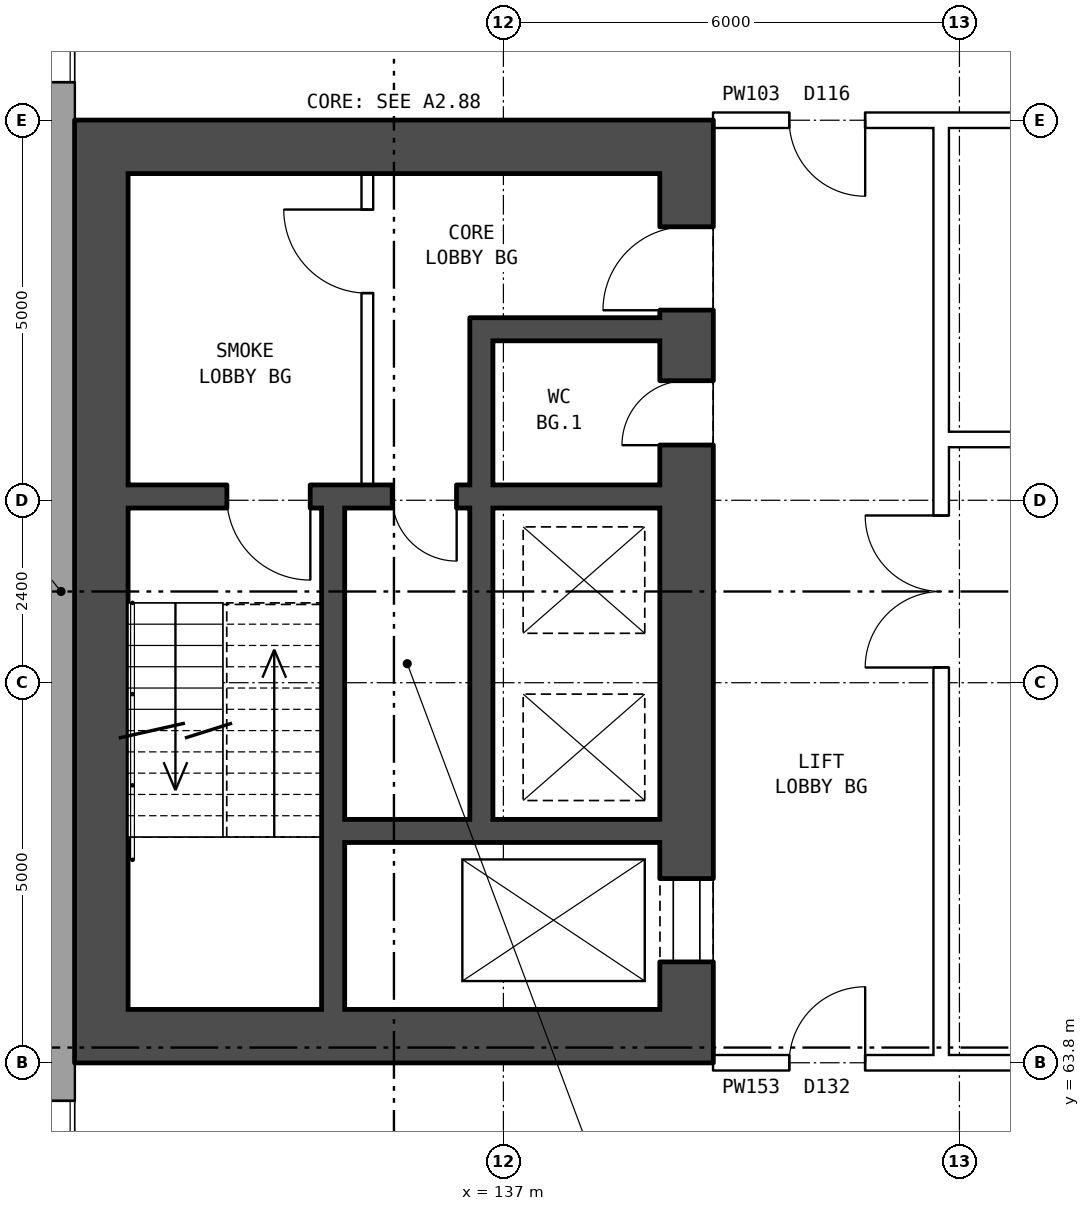
"""IFC4 building model, lengths in metres.
Left out: names, types, materials, properties, quantities, classifications, styles, units other than length and angle.
Written with IfcOpenShell. Run it as: python <this file> out.ifc"""

import sys

from ifc_helpers import new_model, si_unit, direction, frame, frame_2d, origin, place, context, subcontext, project, spatial, rectangle, extrude, element, fill, save


model = new_model("IFC4")
c1 = context("Model", 3, precision=1e-05, world=origin(), true_north=direction((0.0, 1.0)))
c2 = subcontext(c1, "Body", "Model", "MODEL_VIEW")
j1 = project(units=[si_unit("LENGTHUNIT", "METRE"), si_unit("PLANEANGLEUNIT", "RADIAN")], contexts=[c1])
p1 = place(None, origin())
s1 = spatial("IfcSite", under=j1, at=p1, CompositionType="ELEMENT")
p2 = place(p1, origin())
s2 = spatial("IfcBuilding", under=s1, at=p2, CompositionType="ELEMENT")
p3 = place(p2, frame((0.0, 0.0, 67.4)))
s3 = spatial("IfcBuildingStorey", under=s2, at=p3, CompositionType="ELEMENT", Elevation=67.4)
p4 = place(p3, frame((131.18, 82.925, 0.0), z_axis=(0.0, 0.0, 1.0), x_axis=(0.0, -1.0, 0.0)))
e1 = element("IfcWall", 1, at=p4, inside=s3, PredefinedType="STANDARD", context=c2, shape_type="SweptSolid", body=[
    extrude(rectangle(XDim=25.851, YDim=0.36, at=frame_2d((12.925, 0.0))), origin(), (0.0, 0.0, 1.0), 3.6),
])
p5 = place(p4, frame((1.625, 0.0, 0.8)))
e2 = element("IfcOpeningElement", 2, at=p5, cuts=e1, PredefinedType="OPENING", context=c2, shape_type="SweptSolid", body=[
    extrude(rectangle(XDim=1.6, YDim=1.8, at=frame_2d((0.8, 0.9))), frame((0.0, 0.19, 0.0), z_axis=(0.0, -1.0, 0.0), x_axis=(1.0, 0.0, 0.0)), (0.0, 0.0, 1.0), 0.38),
])
p6 = place(p4, frame((4.625, 0.0, 0.8)))
e3 = element("IfcOpeningElement", 3, at=p6, cuts=e1, PredefinedType="OPENING", context=c2, shape_type="SweptSolid", body=[
    extrude(rectangle(XDim=1.6, YDim=1.8, at=frame_2d((0.8, 0.9))), frame((0.0, 0.19, 0.0), z_axis=(0.0, -1.0, 0.0), x_axis=(1.0, 0.0, 0.0)), (0.0, 0.0, 1.0), 0.38),
])
p7 = place(p4, frame((19.625, 0.0, 0.8)))
e4 = element("IfcOpeningElement", 4, at=p7, cuts=e1, PredefinedType="OPENING", context=c2, shape_type="SweptSolid", body=[
    extrude(rectangle(XDim=1.6, YDim=1.8, at=frame_2d((0.8, 0.9))), frame((0.0, 0.19, 0.0), z_axis=(0.0, -1.0, 0.0), x_axis=(1.0, 0.0, 0.0)), (0.0, 0.0, 1.0), 0.38),
])
p8 = place(p4, frame((22.625, 0.0, 0.8)))
e5 = element("IfcOpeningElement", 5, at=p8, cuts=e1, PredefinedType="OPENING", context=c2, shape_type="SweptSolid", body=[
    extrude(rectangle(XDim=1.6, YDim=1.8, at=frame_2d((0.8, 0.9))), frame((0.0, 0.19, 0.0), z_axis=(0.0, -1.0, 0.0), x_axis=(1.0, 0.0, 0.0)), (0.0, 0.0, 1.0), 0.38),
])
p9 = place(p3, frame((139.41, 64.5, 0.0), z_axis=(0.0, 0.0, 1.0), x_axis=(0.0, 1.0, 0.0)))
e6 = element("IfcWall", 6, at=p9, inside=s3, PredefinedType="SHEAR", context=c2, shape_type="SweptSolid", body=[
    extrude(rectangle(XDim=11.0, YDim=0.7, at=frame_2d((5.5, 0.0))), origin(), (0.0, 0.0, 1.0), 3.6),
])
p10 = place(p9, frame((0.625, 0.0, 0.0)))
e7 = element("IfcOpeningElement", 7, at=p10, cuts=e6, PredefinedType="OPENING", context=c2, shape_type="SweptSolid", body=[
    extrude(rectangle(XDim=1.1, YDim=2.1, at=frame_2d((0.55, 1.05))), frame((0.0, 0.36, 0.0), z_axis=(0.0, -1.0, 0.0), x_axis=(1.0, 0.0, 0.0)), (0.0, 0.0, 1.0), 0.72),
])
p11 = place(p9, frame((9.2, 0.0, 0.0)))
e8 = element("IfcOpeningElement", 8, at=p11, cuts=e6, PredefinedType="OPENING", context=c2, shape_type="SweptSolid", body=[
    extrude(rectangle(XDim=1.1, YDim=2.1, at=frame_2d((0.55, 1.05))), frame((0.0, 0.36, 0.0), z_axis=(0.0, -1.0, 0.0), x_axis=(1.0, 0.0, 0.0)), (0.0, 0.0, 1.0), 0.72),
])
p12 = place(p9, frame((7.425, 0.0, 0.0)))
e9 = element("IfcOpeningElement", 9, at=p12, cuts=e6, PredefinedType="OPENING", context=c2, shape_type="SweptSolid", body=[
    extrude(rectangle(XDim=0.85, YDim=2.1, at=frame_2d((0.425, 1.05))), frame((0.0, 0.36, 0.0), z_axis=(0.0, -1.0, 0.0), x_axis=(1.0, 0.0, 0.0)), (0.0, 0.0, 1.0), 0.72),
])
p13 = place(p3, frame((131.71, 64.5, 0.0), z_axis=(0.0, 0.0, 1.0), x_axis=(0.0, 1.0, 0.0)))
e10 = element("IfcWall", 10, at=p13, inside=s3, PredefinedType="SHEAR", context=c2, shape_type="SweptSolid", body=[
    extrude(rectangle(XDim=11.0, YDim=0.7, at=frame_2d((5.5, 0.0))), origin(), (0.0, 0.0, 1.0), 3.6),
])
for number, where, z_axis, x_axis in (
    (11, (139.76, 64.15, 0.0), (0.0, 0.0, 1.0), (-1.0, 0.0, 0.0)),
    (12, (139.76, 75.85, 0.0), (0.0, 0.0, 1.0), (-1.0, 0.0, 0.0)),
):
    element("IfcWall", number, at=place(p3, frame(where, z_axis=z_axis, x_axis=x_axis)), inside=s3, PredefinedType="SHEAR", context=c2, shape_type="SweptSolid", body=[
        extrude(rectangle(XDim=8.4, YDim=0.7, at=frame_2d((4.2, 0.0))), origin(), (0.0, 0.0, 1.0), 3.6),
    ])
p14 = place(p3, frame((139.06, 66.85, 0.0), z_axis=(0.0, 0.0, 1.0), x_axis=(-1.0, 0.0, 0.0)))
e13 = element("IfcWall", 13, at=p14, inside=s3, PredefinedType="SHEAR", context=c2, shape_type="SweptSolid", body=[
    extrude(rectangle(XDim=4.15, YDim=0.3, at=frame_2d((2.075, 0.0))), origin(), (0.0, 0.0, 1.0), 3.6),
])
p15 = place(p3, frame((139.06, 71.25, 0.0), z_axis=(0.0, 0.0, 1.0), x_axis=(-1.0, 0.0, 0.0)))
e14 = element("IfcWall", 14, at=p15, inside=s3, PredefinedType="SHEAR", context=c2, shape_type="SweptSolid", body=[
    extrude(rectangle(XDim=7.0, YDim=0.3, at=frame_2d((3.5, 0.0))), origin(), (0.0, 0.0, 1.0), 3.6),
])
p16 = place(p15, frame((4.6, 0.0, 0.0)))
e15 = element("IfcOpeningElement", 15, at=p16, cuts=e14, PredefinedType="OPENING", context=c2, shape_type="SweptSolid", body=[
    extrude(rectangle(XDim=1.1, YDim=2.1, at=frame_2d((0.55, 1.05))), frame((0.0, 0.16, 0.0), z_axis=(0.0, -1.0, 0.0), x_axis=(1.0, 0.0, 0.0)), (0.0, 0.0, 1.0), 0.32),
])
p17 = place(p15, frame((2.675, 0.0, 0.0)))
e16 = element("IfcOpeningElement", 16, at=p17, cuts=e14, PredefinedType="OPENING", context=c2, shape_type="SweptSolid", body=[
    extrude(rectangle(XDim=0.85, YDim=2.1, at=frame_2d((0.425, 1.05))), frame((0.0, 0.16, 0.0), z_axis=(0.0, -1.0, 0.0), x_axis=(1.0, 0.0, 0.0)), (0.0, 0.0, 1.0), 0.32),
])
p18 = place(p3, frame((139.06, 73.45, 0.0), z_axis=(0.0, 0.0, 1.0), x_axis=(-1.0, 0.0, 0.0)))
e17 = element("IfcWall", 17, at=p18, inside=s3, PredefinedType="SHEAR", context=c2, shape_type="SweptSolid", body=[
    extrude(rectangle(XDim=2.2, YDim=0.3, at=frame_2d((1.1, 0.0))), origin(), (0.0, 0.0, 1.0), 3.6),
])
p19 = place(p3, frame((136.71, 67.0, 0.0), z_axis=(0.0, 0.0, 1.0), x_axis=(0.0, 1.0, 0.0)))
e18 = element("IfcWall", 18, at=p19, inside=s3, PredefinedType="SHEAR", context=c2, shape_type="SweptSolid", body=[
    extrude(rectangle(XDim=4.1, YDim=0.3, at=frame_2d((2.05, 0.0))), origin(), (0.0, 0.0, 1.0), 3.6),
])
p20 = place(p3, frame((136.71, 71.4, 0.0), z_axis=(0.0, 0.0, 1.0), x_axis=(0.0, 1.0, 0.0)))
e19 = element("IfcWall", 19, at=p20, inside=s3, PredefinedType="SHEAR", context=c2, shape_type="SweptSolid", body=[
    extrude(rectangle(XDim=2.2, YDim=0.3, at=frame_2d((1.1, 0.0))), origin(), (0.0, 0.0, 1.0), 3.6),
])
p21 = place(p3, frame((135.21, 71.4, 0.0), z_axis=(0.0, 0.0, 1.0), x_axis=(0.0, 1.0, 0.0)))
e20 = element("IfcWall", 20, at=p21, inside=s3, PredefinedType="PARTITIONING", context=c2, shape_type="SweptSolid", body=[
    extrude(rectangle(XDim=4.1, YDim=0.15, at=frame_2d((2.05, 0.0))), origin(), (0.0, 0.0, 1.0), 3.6),
])
p22 = place(p21, frame((2.525, 0.0, 0.0)))
e21 = element("IfcOpeningElement", 21, at=p22, cuts=e20, PredefinedType="OPENING", context=c2, shape_type="SweptSolid", body=[
    extrude(rectangle(XDim=1.1, YDim=2.1, at=frame_2d((0.55, 1.05))), frame((0.0, 0.085, 0.0), z_axis=(0.0, -1.0, 0.0), x_axis=(1.0, 0.0, 0.0)), (0.0, 0.0, 1.0), 0.17),
])
p23 = place(p3, frame((134.76, 64.5, 0.0), z_axis=(0.0, 0.0, 1.0), x_axis=(0.0, 1.0, 0.0)))
e22 = element("IfcWall", 22, at=p23, inside=s3, PredefinedType="SHEAR", context=c2, shape_type="SweptSolid", body=[
    extrude(rectangle(XDim=6.6, YDim=0.3, at=frame_2d((3.3, 0.0))), origin(), (0.0, 0.0, 1.0), 3.6),
])
p24 = place(p3, frame((142.76, 63.9, 0.0), z_axis=(0.0, 0.0, 1.0), x_axis=(0.0, 1.0, 0.0)))
e23 = element("IfcWall", 23, at=p24, inside=s3, PredefinedType="PARTITIONING", context=c2, shape_type="SweptSolid", body=[
    extrude(rectangle(XDim=12.2, YDim=0.2, at=frame_2d((6.1, 0.0))), origin(), (0.0, 0.0, 1.0), 3.6),
])
p25 = place(p24, frame((5.1, 0.0, 0.0)))
e24 = element("IfcOpeningElement", 24, at=p25, cuts=e23, PredefinedType="OPENING", context=c2, shape_type="SweptSolid", body=[
    extrude(rectangle(XDim=2.0, YDim=2.1, at=frame_2d((1.0, 1.05))), frame((0.0, 0.11, 0.0), z_axis=(0.0, -1.0, 0.0), x_axis=(1.0, 0.0, 0.0)), (0.0, 0.0, 1.0), 0.22),
])
p26 = place(p3, frame((142.76, 63.8, 0.0), z_axis=(0.0, 0.0, 1.0), x_axis=(1.0, 0.0, 0.0)))
e25 = element("IfcWall", 25, at=p26, inside=s3, PredefinedType="PARTITIONING", context=c2, shape_type="SweptSolid", body=[
    extrude(rectangle(XDim=14.48, YDim=0.2, at=frame_2d((7.24, 0.0))), origin(), (0.0, 0.0, 1.0), 3.6),
])
p27 = place(p3, frame((139.76, 63.8, 0.0), z_axis=(0.0, 0.0, 1.0), x_axis=(1.0, 0.0, 0.0)))
e26 = element("IfcWall", 26, at=p27, inside=s3, PredefinedType="PARTITIONING", context=c2, shape_type="SweptSolid", body=[
    extrude(rectangle(XDim=3.0, YDim=0.2, at=frame_2d((1.5, 0.0))), origin(), (0.0, 0.0, 1.0), 3.6),
])
p28 = place(p27, frame((1.0, 0.0, 0.0)))
e27 = element("IfcOpeningElement", 27, at=p28, cuts=e26, PredefinedType="OPENING", context=c2, shape_type="SweptSolid", body=[
    extrude(rectangle(XDim=1.0, YDim=2.1, at=frame_2d((0.5, 1.05))), frame((0.0, 0.11, 0.0), z_axis=(0.0, -1.0, 0.0), x_axis=(1.0, 0.0, 0.0)), (0.0, 0.0, 1.0), 0.22),
])
p29 = place(p3, frame((142.76, 72.0, 0.0), z_axis=(0.0, 0.0, 1.0), x_axis=(1.0, 0.0, 0.0)))
e28 = element("IfcWall", 28, at=p29, inside=s3, PredefinedType="PARTITIONING", context=c2, shape_type="SweptSolid", body=[
    extrude(rectangle(XDim=14.48, YDim=0.2, at=frame_2d((7.24, 0.0))), origin(), (0.0, 0.0, 1.0), 3.6),
])
p30 = place(p29, frame((6.34, 0.0, 0.0)))
e29 = element("IfcOpeningElement", 29, at=p30, cuts=e28, PredefinedType="OPENING", context=c2, shape_type="SweptSolid", body=[
    extrude(rectangle(XDim=1.8, YDim=2.1, at=frame_2d((0.9, 1.05))), frame((0.0, 0.11, 0.0), z_axis=(0.0, -1.0, 0.0), x_axis=(1.0, 0.0, 0.0)), (0.0, 0.0, 1.0), 0.22),
])
p31 = place(p3, frame((142.76, 76.2, 0.0), z_axis=(0.0, 0.0, 1.0), x_axis=(1.0, 0.0, 0.0)))
e30 = element("IfcWall", 30, at=p31, inside=s3, PredefinedType="PARTITIONING", context=c2, shape_type="SweptSolid", body=[
    extrude(rectangle(XDim=14.48, YDim=0.2, at=frame_2d((7.24, 0.0))), origin(), (0.0, 0.0, 1.0), 3.6),
])
p32 = place(p31, frame((6.34, 0.0, 0.0)))
e31 = element("IfcOpeningElement", 31, at=p32, cuts=e30, PredefinedType="OPENING", context=c2, shape_type="SweptSolid", body=[
    extrude(rectangle(XDim=1.8, YDim=2.1, at=frame_2d((0.9, 1.05))), frame((0.0, 0.11, 0.0), z_axis=(0.0, -1.0, 0.0), x_axis=(1.0, 0.0, 0.0)), (0.0, 0.0, 1.0), 0.22),
])
p33 = place(p3, frame((139.76, 76.2, 0.0), z_axis=(0.0, 0.0, 1.0), x_axis=(1.0, 0.0, 0.0)))
e32 = element("IfcWall", 32, at=p33, inside=s3, PredefinedType="PARTITIONING", context=c2, shape_type="SweptSolid", body=[
    extrude(rectangle(XDim=3.0, YDim=0.2, at=frame_2d((1.5, 0.0))), origin(), (0.0, 0.0, 1.0), 3.6),
])
p34 = place(p33, frame((1.0, 0.0, 0.0)))
e33 = element("IfcOpeningElement", 33, at=p34, cuts=e32, PredefinedType="OPENING", context=c2, shape_type="SweptSolid", body=[
    extrude(rectangle(XDim=1.0, YDim=2.1, at=frame_2d((0.5, 1.05))), frame((0.0, 0.11, 0.0), z_axis=(0.0, -1.0, 0.0), x_axis=(1.0, 0.0, 0.0)), (0.0, 0.0, 1.0), 0.22),
])
p35 = place(p6, origin())
e34 = element("IfcWindow", 34, at=p35, inside=s3, PartitioningType="SINGLE_PANEL", PredefinedType="WINDOW", context=c2, shape_type="SweptSolid", body=[
    extrude(rectangle(XDim=1.6, YDim=1.8, at=frame_2d((0.8, 0.9))), frame((0.0, 0.15, 0.0), z_axis=(0.0, -1.0, 0.0), x_axis=(1.0, 0.0, 0.0)), (0.0, 0.0, 1.0), 0.06),
])
fill(e3, e34)
p36 = place(p7, origin())
e35 = element("IfcWindow", 35, at=p36, inside=s3, PartitioningType="SINGLE_PANEL", PredefinedType="WINDOW", context=c2, shape_type="SweptSolid", body=[
    extrude(rectangle(XDim=1.6, YDim=1.8, at=frame_2d((0.8, 0.9))), frame((0.0, 0.15, 0.0), z_axis=(0.0, -1.0, 0.0), x_axis=(1.0, 0.0, 0.0)), (0.0, 0.0, 1.0), 0.06),
])
fill(e4, e35)
p37 = place(p10, origin())
e36 = element("IfcDoor", 36, at=p37, inside=s3, OperationType="DOUBLE_DOOR_SLIDING", PredefinedType="DOOR", context=c2, shape_type="SweptSolid", body=[
    extrude(rectangle(XDim=1.1, YDim=2.1, at=frame_2d((0.55, 1.05))), frame((0.0, 0.335, 0.0), z_axis=(0.0, -1.0, 0.0), x_axis=(1.0, 0.0, 0.0)), (0.0, 0.0, 1.0), 0.05),
])
fill(e7, e36)
p38 = place(p11, origin())
e37 = element("IfcDoor", 37, at=p38, inside=s3, OperationType="SINGLE_SWING_LEFT", PredefinedType="DOOR", context=c2, shape_type="SweptSolid", body=[
    extrude(rectangle(XDim=1.1, YDim=2.1, at=frame_2d((0.55, 1.05))), frame((0.0, 0.335, 0.0), z_axis=(0.0, -1.0, 0.0), x_axis=(1.0, 0.0, 0.0)), (0.0, 0.0, 1.0), 0.05),
])
fill(e8, e37)
p39 = place(p22, origin())
e38 = element("IfcDoor", 38, at=p39, inside=s3, OperationType="SINGLE_SWING_RIGHT", PredefinedType="DOOR", context=c2, shape_type="SweptSolid", body=[
    extrude(rectangle(XDim=1.1, YDim=2.1, at=frame_2d((0.55, 1.05))), frame((0.0, 0.025, 0.0), z_axis=(0.0, -1.0, 0.0), x_axis=(1.0, 0.0, 0.0)), (0.0, 0.0, 1.0), 0.05),
])
fill(e21, e38)
p40 = place(p16, origin())
e39 = element("IfcDoor", 39, at=p40, inside=s3, OperationType="SINGLE_SWING_LEFT", PredefinedType="DOOR", context=c2, shape_type="SweptSolid", body=[
    extrude(rectangle(XDim=1.1, YDim=2.1, at=frame_2d((0.55, 1.05))), frame((0.0, 0.025, 0.0), z_axis=(0.0, -1.0, 0.0), x_axis=(1.0, 0.0, 0.0)), (0.0, 0.0, 1.0), 0.05),
])
fill(e15, e39)
p41 = place(p12, origin())
e40 = element("IfcDoor", 40, at=p41, inside=s3, OperationType="SINGLE_SWING_LEFT", PredefinedType="DOOR", context=c2, shape_type="SweptSolid", body=[
    extrude(rectangle(XDim=0.85, YDim=2.1, at=frame_2d((0.425, 1.05))), frame((0.0, 0.335, 0.0), z_axis=(0.0, -1.0, 0.0), x_axis=(1.0, 0.0, 0.0)), (0.0, 0.0, 1.0), 0.05),
])
fill(e9, e40)
p42 = place(p17, origin())
e41 = element("IfcDoor", 41, at=p42, inside=s3, OperationType="SINGLE_SWING_LEFT", PredefinedType="DOOR", context=c2, shape_type="SweptSolid", body=[
    extrude(rectangle(XDim=0.85, YDim=2.1, at=frame_2d((0.425, 1.05))), frame((0.0, 0.025, 0.0), z_axis=(0.0, -1.0, 0.0), x_axis=(1.0, 0.0, 0.0)), (0.0, 0.0, 1.0), 0.05),
])
fill(e16, e41)
p43 = place(p25, origin())
e42 = element("IfcDoor", 42, at=p43, inside=s3, OperationType="DOUBLE_DOOR_SINGLE_SWING", PredefinedType="DOOR", context=c2, shape_type="SweptSolid", body=[
    extrude(rectangle(XDim=2.0, YDim=2.1, at=frame_2d((1.0, 1.05))), frame((0.0, 0.025, 0.0), z_axis=(0.0, -1.0, 0.0), x_axis=(1.0, 0.0, 0.0)), (0.0, 0.0, 1.0), 0.05),
])
fill(e24, e42)
p44 = place(p28, origin())
e43 = element("IfcDoor", 43, at=p44, inside=s3, OperationType="SINGLE_SWING_RIGHT", PredefinedType="DOOR", context=c2, shape_type="SweptSolid", body=[
    extrude(rectangle(XDim=1.0, YDim=2.1, at=frame_2d((0.5, 1.05))), frame((0.0, 0.025, 0.0), z_axis=(0.0, -1.0, 0.0), x_axis=(1.0, 0.0, 0.0)), (0.0, 0.0, 1.0), 0.05),
])
fill(e27, e43)
p45 = place(p34, frame((1.0, 0.0, 0.0), z_axis=(0.0, 0.0, 1.0), x_axis=(-1.0, 0.0, 0.0)))
e44 = element("IfcDoor", 44, at=p45, inside=s3, OperationType="SINGLE_SWING_LEFT", PredefinedType="DOOR", context=c2, shape_type="SweptSolid", body=[
    extrude(rectangle(XDim=1.0, YDim=2.1, at=frame_2d((0.5, 1.05))), frame((0.0, 0.025, 0.0), z_axis=(0.0, -1.0, 0.0), x_axis=(1.0, 0.0, 0.0)), (0.0, 0.0, 1.0), 0.05),
])
fill(e33, e44)
save(model, sys.argv[1])
